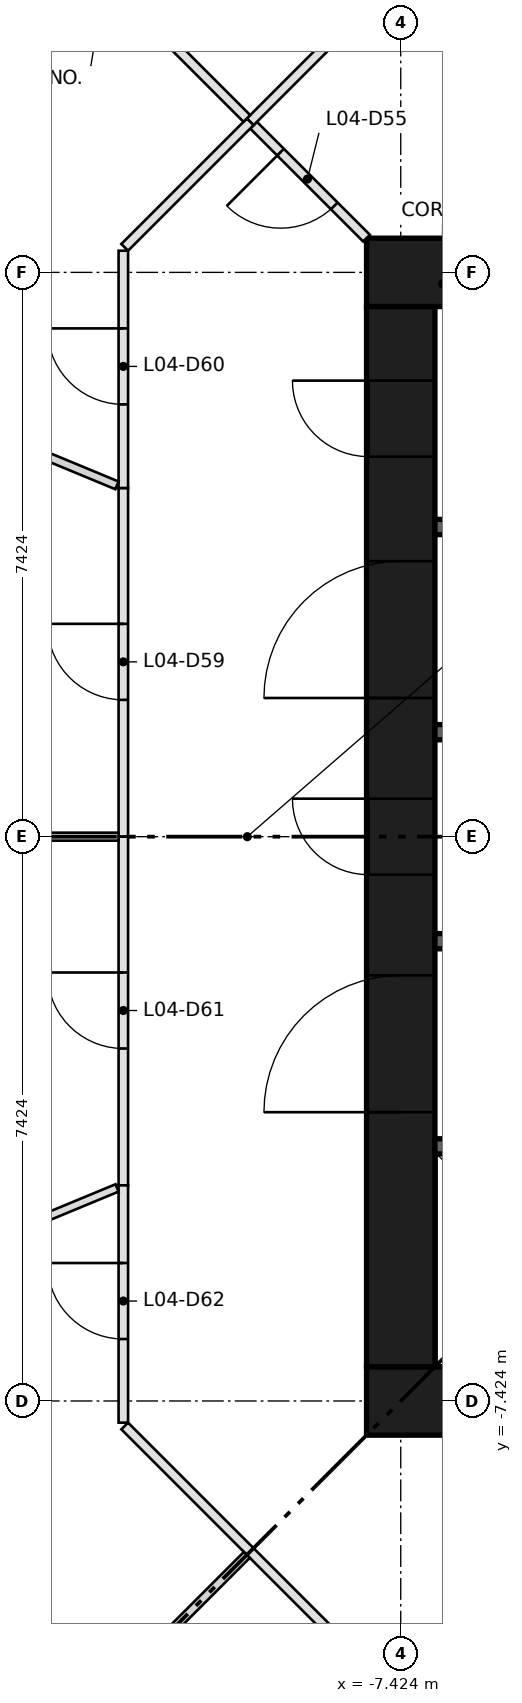
"""IFC4 building model, lengths in metres.
Left out: names, types, materials, properties, quantities, classifications, styles, units other than length and angle.
Written with IfcOpenShell. Run it as: python <this file> out.ifc"""

import sys

from ifc_helpers import new_model, si_unit, direction, frame, frame_2d, origin, place, context, subcontext, project, spatial, rectangle, extrude, element, fill, save


model = new_model("IFC4")
c1 = context("Model", 3, precision=1e-05, world=origin(), true_north=direction((0.0, 1.0)))
c2 = subcontext(c1, "Body", "Model", "MODEL_VIEW")
j1 = project(units=[si_unit("LENGTHUNIT", "METRE"), si_unit("PLANEANGLEUNIT", "RADIAN")], contexts=[c1])
p1 = place(None, origin())
s1 = spatial("IfcSite", under=j1, at=p1, CompositionType="ELEMENT")
p2 = place(p1, origin())
s2 = spatial("IfcBuilding", under=s1, at=p2, CompositionType="ELEMENT")
p3 = place(p2, frame((0.0, 0.0, 18.5)))
s3 = spatial("IfcBuildingStorey", under=s2, at=p3, CompositionType="ELEMENT", Elevation=18.5)
for number, where, z_axis, x_axis in (
    (1, (-7.874, -7.424, 0.0), (0.0, 0.0, 1.0), (1.0, 0.0, 0.0)),
    (2, (-7.874, 7.424, 0.0), (0.0, 0.0, 1.0), (1.0, 0.0, 0.0)),
):
    element("IfcWall", number, at=place(p3, frame(where, z_axis=z_axis, x_axis=x_axis)), inside=s3, PredefinedType="SHEAR", context=c2, shape_type="SweptSolid", body=[
        extrude(rectangle(XDim=15.748, YDim=0.9, at=frame_2d((7.874, 0.0))), origin(), (0.0, 0.0, 1.0), 3.9),
    ])
p4 = place(p3, frame((-7.424, -6.974, 0.0), z_axis=(0.0, 0.0, 1.0), x_axis=(0.0, 1.0, 0.0)))
e3 = element("IfcWall", 3, at=p4, inside=s3, PredefinedType="SHEAR", context=c2, shape_type="SweptSolid", body=[
    extrude(rectangle(XDim=13.948, YDim=0.9, at=frame_2d((6.974, 0.0))), origin(), (0.0, 0.0, 1.0), 3.9),
])
p5 = place(p4, frame((6.474, 0.0, 0.0)))
e4 = element("IfcOpeningElement", 4, at=p5, cuts=e3, PredefinedType="OPENING", context=c2, shape_type="SweptSolid", body=[
    extrude(rectangle(XDim=1.0, YDim=2.1, at=frame_2d((0.5, 1.05))), frame((0.0, 0.46, 0.0), z_axis=(0.0, -1.0, 0.0), x_axis=(1.0, 0.0, 0.0)), (0.0, 0.0, 1.0), 0.92),
])
p6 = place(p4, frame((3.35, 0.0, 0.0)))
e5 = element("IfcOpeningElement", 5, at=p6, cuts=e3, PredefinedType="OPENING", context=c2, shape_type="SweptSolid", body=[
    extrude(rectangle(XDim=1.8, YDim=2.1, at=frame_2d((0.9, 1.05))), frame((0.0, 0.46, 0.0), z_axis=(0.0, -1.0, 0.0), x_axis=(1.0, 0.0, 0.0)), (0.0, 0.0, 1.0), 0.92),
])
p7 = place(p4, frame((8.799, 0.0, 0.0)))
e6 = element("IfcOpeningElement", 6, at=p7, cuts=e3, PredefinedType="OPENING", context=c2, shape_type="SweptSolid", body=[
    extrude(rectangle(XDim=1.8, YDim=2.1, at=frame_2d((0.9, 1.05))), frame((0.0, 0.46, 0.0), z_axis=(0.0, -1.0, 0.0), x_axis=(1.0, 0.0, 0.0)), (0.0, 0.0, 1.0), 0.92),
])
p8 = place(p4, frame((11.974, 0.0, 0.0)))
e7 = element("IfcOpeningElement", 7, at=p8, cuts=e3, PredefinedType="OPENING", context=c2, shape_type="SweptSolid", body=[
    extrude(rectangle(XDim=1.0, YDim=2.1, at=frame_2d((0.5, 1.05))), frame((0.0, 0.46, 0.0), z_axis=(0.0, -1.0, 0.0), x_axis=(1.0, 0.0, 0.0)), (0.0, 0.0, 1.0), 0.92),
])
p9 = place(p3, frame((-6.974, -4.074, 0.0), z_axis=(0.0, 0.0, 1.0), x_axis=(1.0, 0.0, 0.0)))
e8 = element("IfcWall", 8, at=p9, inside=s3, PredefinedType="SHEAR", context=c2, shape_type="SweptSolid", body=[
    extrude(rectangle(XDim=13.948, YDim=0.2, at=frame_2d((6.974, 0.0))), origin(), (0.0, 0.0, 1.0), 3.55),
])
p10 = place(p9, frame((0.918, 0.0, 0.0)))
e9 = element("IfcOpeningElement", 9, at=p10, cuts=e8, PredefinedType="OPENING", context=c2, shape_type="SweptSolid", body=[
    extrude(rectangle(XDim=1.1, YDim=2.1, at=frame_2d((0.55, 1.05))), frame((0.0, 0.11, 0.0), z_axis=(0.0, -1.0, 0.0), x_axis=(1.0, 0.0, 0.0)), (0.0, 0.0, 1.0), 0.22),
])
p11 = place(p9, frame((4.055, 0.0, 0.0)))
e10 = element("IfcOpeningElement", 10, at=p11, cuts=e8, PredefinedType="OPENING", context=c2, shape_type="SweptSolid", body=[
    extrude(rectangle(XDim=1.1, YDim=2.1, at=frame_2d((0.55, 1.05))), frame((0.0, 0.11, 0.0), z_axis=(0.0, -1.0, 0.0), x_axis=(1.0, 0.0, 0.0)), (0.0, 0.0, 1.0), 0.22),
])
p12 = place(p9, frame((6.658, 0.0, 0.0)))
e11 = element("IfcOpeningElement", 11, at=p12, cuts=e8, PredefinedType="OPENING", context=c2, shape_type="SweptSolid", body=[
    extrude(rectangle(XDim=1.0, YDim=2.1, at=frame_2d((0.5, 1.05))), frame((0.0, 0.11, 0.0), z_axis=(0.0, -1.0, 0.0), x_axis=(1.0, 0.0, 0.0)), (0.0, 0.0, 1.0), 0.22),
])
p13 = place(p9, frame((8.627, 0.0, 0.0)))
e12 = element("IfcOpeningElement", 12, at=p13, cuts=e8, PredefinedType="OPENING", context=c2, shape_type="SweptSolid", body=[
    extrude(rectangle(XDim=1.0, YDim=2.1, at=frame_2d((0.5, 1.05))), frame((0.0, 0.11, 0.0), z_axis=(0.0, -1.0, 0.0), x_axis=(1.0, 0.0, 0.0)), (0.0, 0.0, 1.0), 0.22),
])
p14 = place(p9, frame((10.595, 0.0, 0.0)))
e13 = element("IfcOpeningElement", 13, at=p14, cuts=e8, PredefinedType="OPENING", context=c2, shape_type="SweptSolid", body=[
    extrude(rectangle(XDim=1.0, YDim=2.1, at=frame_2d((0.5, 1.05))), frame((0.0, 0.11, 0.0), z_axis=(0.0, -1.0, 0.0), x_axis=(1.0, 0.0, 0.0)), (0.0, 0.0, 1.0), 0.22),
])
p15 = place(p9, frame((12.564, 0.0, 0.0)))
e14 = element("IfcOpeningElement", 14, at=p15, cuts=e8, PredefinedType="OPENING", context=c2, shape_type="SweptSolid", body=[
    extrude(rectangle(XDim=1.0, YDim=2.1, at=frame_2d((0.5, 1.05))), frame((0.0, 0.11, 0.0), z_axis=(0.0, -1.0, 0.0), x_axis=(1.0, 0.0, 0.0)), (0.0, 0.0, 1.0), 0.22),
])
p16 = place(p3, frame((-6.974, 4.074, 0.0), z_axis=(0.0, 0.0, 1.0), x_axis=(1.0, 0.0, 0.0)))
e15 = element("IfcWall", 15, at=p16, inside=s3, PredefinedType="SHEAR", context=c2, shape_type="SweptSolid", body=[
    extrude(rectangle(XDim=6.974, YDim=0.2, at=frame_2d((3.487, 0.0))), origin(), (0.0, 0.0, 1.0), 3.55),
])
for number, where, z_axis, x_axis in (
    (16, (-6.974, -1.375, 0.0), (0.0, 0.0, 1.0), (1.0, 0.0, 0.0)),
    (17, (-6.974, 1.375, 0.0), (0.0, 0.0, 1.0), (1.0, 0.0, 0.0)),
):
    element("IfcWall", number, at=place(p3, frame(where, z_axis=z_axis, x_axis=x_axis)), inside=s3, PredefinedType="SHEAR", context=c2, shape_type="SweptSolid", body=[
        extrude(rectangle(XDim=2.6, YDim=0.2, at=frame_2d((1.3, 0.0))), origin(), (0.0, 0.0, 1.0), 3.55),
    ])
p17 = place(p3, frame((-7.874, 7.874, 0.0), z_axis=(0.0, 0.0, 1.0), x_axis=(-0.707106781187, 0.707106781187, 0.0)))
e18 = element("IfcWall", 18, at=p17, inside=s3, PredefinedType="PARTITIONING", context=c2, shape_type="SweptSolid", body=[
    extrude(rectangle(XDim=2.102, YDim=0.125, at=frame_2d((1.051, 0.0))), origin(), (0.0, 0.0, 1.0), 3.55),
])
p18 = place(p17, frame((0.6, 0.0, 0.0)))
e19 = element("IfcOpeningElement", 19, at=p18, cuts=e18, PredefinedType="OPENING", context=c2, shape_type="SweptSolid", body=[
    extrude(rectangle(XDim=1.0, YDim=2.1, at=frame_2d((0.5, 1.05))), frame((0.0, 0.073, 0.0), z_axis=(0.0, -1.0, 0.0), x_axis=(1.0, 0.0, 0.0)), (0.0, 0.0, 1.0), 0.145),
])
p19 = place(p3, frame((-9.405, 9.405, 0.0), z_axis=(0.0, 0.0, 1.0), x_axis=(0.707106781187, 0.707106781187, 0.0)))
e20 = element("IfcWall", 20, at=p19, inside=s3, PredefinedType="PARTITIONING", context=c2, shape_type="SweptSolid", body=[
    extrude(rectangle(XDim=2.335, YDim=0.125, at=frame_2d((1.167, 0.0))), origin(), (0.0, 0.0, 1.0), 3.55),
])
p20 = place(p3, frame((-11.074, 0.0, 0.0), z_axis=(0.0, 0.0, 1.0), x_axis=(0.0, 1.0, 0.0)))
e21 = element("IfcWall", 21, at=p20, inside=s3, PredefinedType="PARTITIONING", context=c2, shape_type="SweptSolid", body=[
    extrude(rectangle(XDim=4.587, YDim=0.125, at=frame_2d((2.293, 0.0))), origin(), (0.0, 0.0, 1.0), 3.55),
])
p21 = place(p20, frame((1.8, 0.0, 0.0)))
e22 = element("IfcOpeningElement", 22, at=p21, cuts=e21, PredefinedType="OPENING", context=c2, shape_type="SweptSolid", body=[
    extrude(rectangle(XDim=1.0, YDim=2.1, at=frame_2d((0.5, 1.05))), frame((0.0, 0.073, 0.0), z_axis=(0.0, -1.0, 0.0), x_axis=(1.0, 0.0, 0.0)), (0.0, 0.0, 1.0), 0.145),
])
p22 = place(p3, frame((-11.074, 4.587, 0.0), z_axis=(0.0, 0.0, 1.0), x_axis=(0.0, 1.0, 0.0)))
e23 = element("IfcWall", 23, at=p22, inside=s3, PredefinedType="PARTITIONING", context=c2, shape_type="SweptSolid", body=[
    extrude(rectangle(XDim=3.122, YDim=0.125, at=frame_2d((1.561, 0.0))), origin(), (0.0, 0.0, 1.0), 3.55),
])
p23 = place(p22, frame((1.1, 0.0, 0.0)))
e24 = element("IfcOpeningElement", 24, at=p23, cuts=e23, PredefinedType="OPENING", context=c2, shape_type="SweptSolid", body=[
    extrude(rectangle(XDim=1.0, YDim=2.1, at=frame_2d((0.5, 1.05))), frame((0.0, 0.073, 0.0), z_axis=(0.0, -1.0, 0.0), x_axis=(1.0, 0.0, 0.0)), (0.0, 0.0, 1.0), 0.145),
])
p24 = place(p3, frame((-11.056, 7.753, 0.0), z_axis=(0.0, 0.0, 1.0), x_axis=(0.707106781187, 0.707106781187, 0.0)))
e25 = element("IfcWall", 25, at=p24, inside=s3, PredefinedType="PARTITIONING", context=c2, shape_type="SweptSolid", body=[
    extrude(rectangle(XDim=2.335, YDim=0.125, at=frame_2d((1.167, 0.0))), origin(), (0.0, 0.0, 1.0), 3.55),
])
p25 = place(p3, frame((-11.074, -4.587, 0.0), z_axis=(0.0, 0.0, 1.0), x_axis=(0.0, 1.0, 0.0)))
e26 = element("IfcWall", 26, at=p25, inside=s3, PredefinedType="PARTITIONING", context=c2, shape_type="SweptSolid", body=[
    extrude(rectangle(XDim=4.587, YDim=0.125, at=frame_2d((2.293, 0.0))), origin(), (0.0, 0.0, 1.0), 3.55),
])
p26 = place(p25, frame((1.8, 0.0, 0.0)))
e27 = element("IfcOpeningElement", 27, at=p26, cuts=e26, PredefinedType="OPENING", context=c2, shape_type="SweptSolid", body=[
    extrude(rectangle(XDim=1.0, YDim=2.1, at=frame_2d((0.5, 1.05))), frame((0.0, 0.073, 0.0), z_axis=(0.0, -1.0, 0.0), x_axis=(1.0, 0.0, 0.0)), (0.0, 0.0, 1.0), 0.145),
])
p27 = place(p3, frame((-11.074, -7.709, 0.0), z_axis=(0.0, 0.0, 1.0), x_axis=(0.0, 1.0, 0.0)))
e28 = element("IfcWall", 28, at=p27, inside=s3, PredefinedType="PARTITIONING", context=c2, shape_type="SweptSolid", body=[
    extrude(rectangle(XDim=3.122, YDim=0.125, at=frame_2d((1.561, 0.0))), origin(), (0.0, 0.0, 1.0), 3.55),
])
p28 = place(p27, frame((1.1, 0.0, 0.0)))
e29 = element("IfcOpeningElement", 29, at=p28, cuts=e28, PredefinedType="OPENING", context=c2, shape_type="SweptSolid", body=[
    extrude(rectangle(XDim=1.0, YDim=2.1, at=frame_2d((0.5, 1.05))), frame((0.0, 0.073, 0.0), z_axis=(0.0, -1.0, 0.0), x_axis=(1.0, 0.0, 0.0)), (0.0, 0.0, 1.0), 0.145),
])
for number, where, z_axis, x_axis in (
    (30, (-9.405, -9.405, 0.0), (0.0, 0.0, 1.0), (-0.707, 0.707, 0.0)),
    (31, (-7.753, -11.056, 0.0), (0.0, 0.0, 1.0), (-0.707, 0.707, 0.0)),
):
    element("IfcWall", number, at=place(p3, frame(where, z_axis=z_axis, x_axis=x_axis)), inside=s3, PredefinedType="PARTITIONING", context=c2, shape_type="SweptSolid", body=[
        extrude(rectangle(XDim=2.335, YDim=0.125, at=frame_2d((1.167, 0.0))), origin(), (0.0, 0.0, 1.0), 3.55),
    ])
p29 = place(p3, frame((-9.449, 9.449, 0.0), z_axis=(0.0, 0.0, 1.0), x_axis=(-0.707106781187, 0.707106781187, 0.0)))
e32 = element("IfcWall", 32, at=p29, inside=s3, PredefinedType="PARTITIONING", context=c2, shape_type="SweptSolid", body=[
    extrude(rectangle(XDim=5.267, YDim=0.125, at=frame_2d((2.634, 0.0))), origin(), (0.0, 0.0, 1.0), 3.55),
])
p30 = place(p3, frame((-13.821, 5.725, 0.0), z_axis=(0.0, 0.0, 1.0), x_axis=(0.923894026861, -0.382648438034, 0.0)))
e33 = element("IfcWall", 33, at=p30, inside=s3, PredefinedType="PARTITIONING", context=c2, shape_type="SweptSolid", body=[
    extrude(rectangle(XDim=2.883, YDim=0.11, at=frame_2d((1.442, 0.0))), origin(), (0.0, 0.0, 1.0), 3.55),
])
p31 = place(p3, frame((-11.136, 0.0, 0.0), z_axis=(0.0, 0.0, 1.0), x_axis=(-1.0, 0.0, 0.0)))
e34 = element("IfcWall", 34, at=p31, inside=s3, PredefinedType="PARTITIONING", context=c2, shape_type="SweptSolid", body=[
    extrude(rectangle(XDim=3.67, YDim=0.105, at=frame_2d((1.835, 0.0))), origin(), (0.0, 0.0, 1.0), 3.55),
])
p32 = place(p3, frame((-11.156, -4.621, 0.0), z_axis=(0.0, 0.0, 1.0), x_axis=(-0.923883753017, -0.382673243004, 0.0)))
e35 = element("IfcWall", 35, at=p32, inside=s3, PredefinedType="PARTITIONING", context=c2, shape_type="SweptSolid", body=[
    extrude(rectangle(XDim=2.884, YDim=0.105, at=frame_2d((1.442, 0.0))), origin(), (0.0, 0.0, 1.0), 3.55),
])
p33 = place(p3, frame((-9.449, -9.449, 0.0), z_axis=(0.0, 0.0, 1.0), x_axis=(-0.707106781187, -0.707106781187, 0.0)))
e36 = element("IfcWall", 36, at=p33, inside=s3, PredefinedType="PARTITIONING", context=c2, shape_type="SweptSolid", body=[
    extrude(rectangle(XDim=5.267, YDim=0.11, at=frame_2d((2.634, 0.0))), origin(), (0.0, 0.0, 1.0), 3.55),
])
p34 = place(p5, origin())
e37 = element("IfcDoor", 37, at=p34, inside=s3, OperationType="SINGLE_SWING_RIGHT", PredefinedType="DOOR", context=c2, shape_type="SweptSolid", body=[
    extrude(rectangle(XDim=1.0, YDim=2.1, at=frame_2d((0.5, 1.05))), frame((0.0, 0.45, 0.0), z_axis=(0.0, -1.0, 0.0), x_axis=(1.0, 0.0, 0.0)), (0.0, 0.0, 1.0), 0.05),
])
fill(e4, e37)
p35 = place(p6, origin())
e38 = element("IfcDoor", 38, at=p35, inside=s3, OperationType="DOUBLE_DOOR_SINGLE_SWING", PredefinedType="DOOR", context=c2, shape_type="SweptSolid", body=[
    extrude(rectangle(XDim=1.8, YDim=2.1, at=frame_2d((0.9, 1.05))), frame((0.0, 0.025, 0.0), z_axis=(0.0, -1.0, 0.0), x_axis=(1.0, 0.0, 0.0)), (0.0, 0.0, 1.0), 0.05),
])
fill(e5, e38)
p36 = place(p7, origin())
e39 = element("IfcDoor", 39, at=p36, inside=s3, OperationType="DOUBLE_DOOR_SINGLE_SWING", PredefinedType="DOOR", context=c2, shape_type="SweptSolid", body=[
    extrude(rectangle(XDim=1.8, YDim=2.1, at=frame_2d((0.9, 1.05))), frame((0.0, 0.025, 0.0), z_axis=(0.0, -1.0, 0.0), x_axis=(1.0, 0.0, 0.0)), (0.0, 0.0, 1.0), 0.05),
])
fill(e6, e39)
p37 = place(p8, origin())
e40 = element("IfcDoor", 40, at=p37, inside=s3, OperationType="SINGLE_SWING_RIGHT", PredefinedType="DOOR", context=c2, shape_type="SweptSolid", body=[
    extrude(rectangle(XDim=1.0, YDim=2.1, at=frame_2d((0.5, 1.05))), frame((0.0, 0.45, 0.0), z_axis=(0.0, -1.0, 0.0), x_axis=(1.0, 0.0, 0.0)), (0.0, 0.0, 1.0), 0.05),
])
fill(e7, e40)
p38 = place(p18, origin())
e41 = element("IfcDoor", 41, at=p38, inside=s3, OperationType="SINGLE_SWING_RIGHT", PredefinedType="DOOR", context=c2, shape_type="SweptSolid", body=[
    extrude(rectangle(XDim=1.0, YDim=2.1, at=frame_2d((0.5, 1.05))), frame((0.0, 0.025, 0.0), z_axis=(0.0, -1.0, 0.0), x_axis=(1.0, 0.0, 0.0)), (0.0, 0.0, 1.0), 0.05),
])
fill(e19, e41)
p39 = place(p21, origin())
e42 = element("IfcDoor", 42, at=p39, inside=s3, OperationType="SINGLE_SWING_RIGHT", PredefinedType="DOOR", context=c2, shape_type="SweptSolid", body=[
    extrude(rectangle(XDim=1.0, YDim=2.1, at=frame_2d((0.5, 1.05))), frame((0.0, 0.025, 0.0), z_axis=(0.0, -1.0, 0.0), x_axis=(1.0, 0.0, 0.0)), (0.0, 0.0, 1.0), 0.05),
])
fill(e22, e42)
p40 = place(p23, origin())
e43 = element("IfcDoor", 43, at=p40, inside=s3, OperationType="SINGLE_SWING_RIGHT", PredefinedType="DOOR", context=c2, shape_type="SweptSolid", body=[
    extrude(rectangle(XDim=1.0, YDim=2.1, at=frame_2d((0.5, 1.05))), frame((0.0, 0.025, 0.0), z_axis=(0.0, -1.0, 0.0), x_axis=(1.0, 0.0, 0.0)), (0.0, 0.0, 1.0), 0.05),
])
fill(e24, e43)
p41 = place(p26, origin())
e44 = element("IfcDoor", 44, at=p41, inside=s3, OperationType="SINGLE_SWING_RIGHT", PredefinedType="DOOR", context=c2, shape_type="SweptSolid", body=[
    extrude(rectangle(XDim=1.0, YDim=2.1, at=frame_2d((0.5, 1.05))), frame((0.0, 0.025, 0.0), z_axis=(0.0, -1.0, 0.0), x_axis=(1.0, 0.0, 0.0)), (0.0, 0.0, 1.0), 0.05),
])
fill(e27, e44)
p42 = place(p28, origin())
e45 = element("IfcDoor", 45, at=p42, inside=s3, OperationType="SINGLE_SWING_RIGHT", PredefinedType="DOOR", context=c2, shape_type="SweptSolid", body=[
    extrude(rectangle(XDim=1.0, YDim=2.1, at=frame_2d((0.5, 1.05))), frame((0.0, 0.025, 0.0), z_axis=(0.0, -1.0, 0.0), x_axis=(1.0, 0.0, 0.0)), (0.0, 0.0, 1.0), 0.05),
])
fill(e29, e45)
save(model, sys.argv[1])
